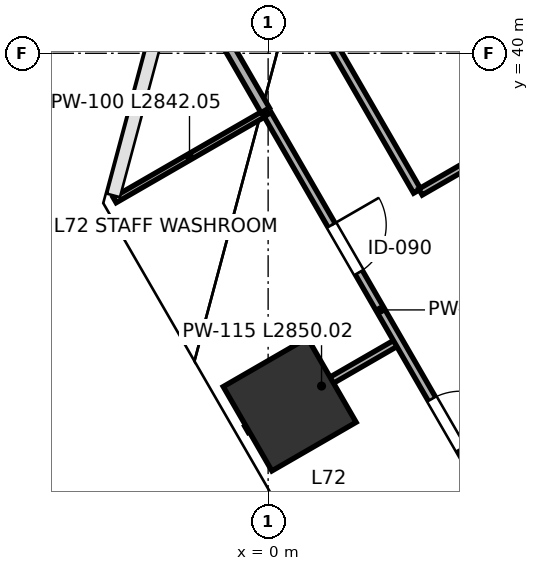
"""IFC4 building model, lengths in metres.
Left out: names, types, materials, properties, quantities, classifications, styles, units other than length and angle.
Written with IfcOpenShell. Run it as: python <this file> out.ifc"""

import sys

from ifc_helpers import new_model, si_unit, direction, frame, frame_2d, origin, origin_2d, place, context, subcontext, project, spatial, rectangle, extrude, source, transform, mapped, element, fill, save


model = new_model("IFC4")
c1 = context("Model", 3, precision=1e-05, world=origin(), true_north=direction((0.0, 1.0)))
c2 = subcontext(c1, "Body", "Model", "MODEL_VIEW")
j1 = project(units=[si_unit("LENGTHUNIT", "METRE"), si_unit("PLANEANGLEUNIT", "RADIAN")], contexts=[c1])
p1 = place(None, origin())
s1 = spatial("IfcSite", under=j1, at=p1, CompositionType="ELEMENT")
p2 = place(p1, origin())
s2 = spatial("IfcBuilding", under=s1, at=p2, CompositionType="ELEMENT")
p3 = place(p2, frame((0.0, 0.0, 319.8)))
s3 = spatial("IfcBuildingStorey", under=s2, at=p3, CompositionType="ELEMENT", Elevation=319.8)
m1 = source(origin(), c2, "Body", "SweptSolid", [
    extrude(rectangle(XDim=1.6, YDim=1.6, at=origin_2d()), origin(), (0.0, 0.0, 1.0), 4.198),
])
p4 = place(p3, frame((0.354, 34.225, 0.001), z_axis=(0.0, 0.0, 1.0), x_axis=(-0.5, 0.866025403784, 0.0)))
e1 = element("IfcColumn", 1, at=p4, inside=s3, PredefinedType="COLUMN", context=c2, shape_type="MappedRepresentation", body=[
    mapped(m1, transform((0.0, 0.0, 0.0), scale=1.0)),
])
p5 = place(p3, frame((-2.524, 37.586, 0.0), z_axis=(0.0, 0.0, 1.0), x_axis=(0.866019653938, 0.500009958894, 0.0)))
e2 = element("IfcWall", 2, at=p5, inside=s3, PredefinedType="PARTITIONING", context=c2, shape_type="SweptSolid", body=[
    extrude(rectangle(XDim=2.842, YDim=0.1, at=frame_2d((1.421, 0.0))), origin(), (0.0, 0.0, 1.0), 3.96),
])
p6 = place(p3, frame((-1.469, 41.523, 0.0), z_axis=(0.0, 0.0, 1.0), x_axis=(0.499945532396, -0.866056848387, 0.0)))
e3 = element("IfcWall", 3, at=p6, inside=s3, PredefinedType="PARTITIONING", context=c2, shape_type="SweptSolid", body=[
    extrude(rectangle(XDim=2.842, YDim=0.16, at=frame_2d((1.421, 0.0))), origin(), (0.0, 0.0, 1.0), 3.96),
])
p7 = place(p3, frame((-0.356, 33.815, 0.0), z_axis=(0.0, 0.0, 1.0), x_axis=(0.866004402611, 0.500036373335, 0.0)))
e4 = element("IfcWall", 4, at=p7, inside=s3, PredefinedType="PARTITIONING", context=c2, shape_type="SweptSolid", body=[
    extrude(rectangle(XDim=2.85, YDim=0.115, at=frame_2d((1.425, 0.0))), origin(), (0.0, 0.0, 1.0), 3.295),
])
p8 = place(p3, frame((-0.008, 38.993, 0.0), z_axis=(0.0, 0.0, 1.0), x_axis=(0.49998923004, -0.866031621735, 0.0)))
e5 = element("IfcWall", 5, at=p8, inside=s3, PredefinedType="PARTITIONING", context=c2, shape_type="SweptSolid", body=[
    extrude(rectangle(XDim=7.42, YDim=0.135, at=frame_2d((3.71, 0.0))), origin(), (0.0, 0.0, 1.0), 3.96),
])
p9 = place(p8, frame((2.1, 0.0, 0.0)))
e6 = element("IfcOpeningElement", 6, at=p9, cuts=e5, PredefinedType="OPENING", context=c2, shape_type="SweptSolid", body=[
    extrude(rectangle(XDim=0.9, YDim=2.15, at=frame_2d((0.45, 1.075))), frame((0.0, 0.078, 0.0), z_axis=(0.0, -1.0, 0.0), x_axis=(1.0, 0.0, 0.0)), (0.0, 0.0, 1.0), 0.155),
])
p10 = place(p8, frame((5.4, 0.0, 0.0)))
e7 = element("IfcOpeningElement", 7, at=p10, cuts=e5, PredefinedType="OPENING", context=c2, shape_type="SweptSolid", body=[
    extrude(rectangle(XDim=0.95, YDim=2.15, at=frame_2d((0.475, 1.075))), frame((0.0, 0.078, 0.0), z_axis=(0.0, -1.0, 0.0), x_axis=(1.0, 0.0, 0.0)), (0.0, 0.0, 1.0), 0.155),
])
p11 = place(p3, frame((-0.564, 42.956, 0.0), z_axis=(0.0, 0.0, 1.0), x_axis=(0.500014506688, -0.866017028182, 0.0)))
e8 = element("IfcWall", 8, at=p11, inside=s3, PredefinedType="PARTITIONING", context=c2, shape_type="SweptSolid", body=[
    extrude(rectangle(XDim=6.03, YDim=0.135, at=frame_2d((3.015, 0.0))), origin(), (0.0, 0.0, 1.0), 3.96),
])
p12 = place(p3, frame((2.506, 37.719, 0.0), z_axis=(0.0, 0.0, 1.0), x_axis=(0.866023290802, 0.500003659775, 0.0)))
e9 = element("IfcWall", 9, at=p12, inside=s3, PredefinedType="PARTITIONING", context=c2, shape_type="SweptSolid", body=[
    extrude(rectangle(XDim=29.61, YDim=0.115, at=frame_2d((14.805, 0.0))), origin(), (0.0, 0.0, 1.0), 3.96),
])
p13 = place(p12, frame((2.1, 0.0, 0.0)))
e10 = element("IfcOpeningElement", 10, at=p13, cuts=e9, PredefinedType="OPENING", context=c2, shape_type="SweptSolid", body=[
    extrude(rectangle(XDim=0.95, YDim=2.15, at=frame_2d((0.475, 1.075))), frame((0.0, 0.067, 0.0), z_axis=(0.0, -1.0, 0.0), x_axis=(1.0, 0.0, 0.0)), (0.0, 0.0, 1.0), 0.135),
])
p14 = place(p12, frame((11.8, 0.0, 0.0)))
e11 = element("IfcOpeningElement", 11, at=p14, cuts=e9, PredefinedType="OPENING", context=c2, shape_type="SweptSolid", body=[
    extrude(rectangle(XDim=0.95, YDim=2.15, at=frame_2d((0.475, 1.075))), frame((0.0, 0.067, 0.0), z_axis=(0.0, -1.0, 0.0), x_axis=(1.0, 0.0, 0.0)), (0.0, 0.0, 1.0), 0.135),
])
m2 = source(origin(), c2, "Body", "SweptSolid", [
    extrude(rectangle(XDim=0.9, YDim=2.15, at=frame_2d((0.45, 1.075))), frame((0.0, 0.025, 0.0), z_axis=(0.0, -1.0, 0.0), x_axis=(1.0, 0.0, 0.0)), (0.0, 0.0, 1.0), 0.05),
])
p15 = place(p9, origin())
e12 = element("IfcDoor", 12, at=p15, inside=s3, OperationType="SINGLE_SWING_LEFT", PredefinedType="DOOR", context=c2, shape_type="MappedRepresentation", body=[
    mapped(m2, transform((0.0, 0.0, 0.0), scale=1.0)),
])
fill(e6, e12)
m3 = source(origin(), c2, "Body", "SweptSolid", [
    extrude(rectangle(XDim=0.95, YDim=2.15, at=frame_2d((0.475, 1.075))), frame((0.0, 0.025, 0.0), z_axis=(0.0, -1.0, 0.0), x_axis=(1.0, 0.0, 0.0)), (0.0, 0.0, 1.0), 0.05),
])
p16 = place(p10, origin())
e13 = element("IfcDoor", 13, at=p16, inside=s3, OperationType="SINGLE_SWING_RIGHT", PredefinedType="DOOR", context=c2, shape_type="MappedRepresentation", body=[
    mapped(m3, transform((0.0, 0.0, 0.0), scale=1.0)),
])
fill(e7, e13)
save(model, sys.argv[1])
